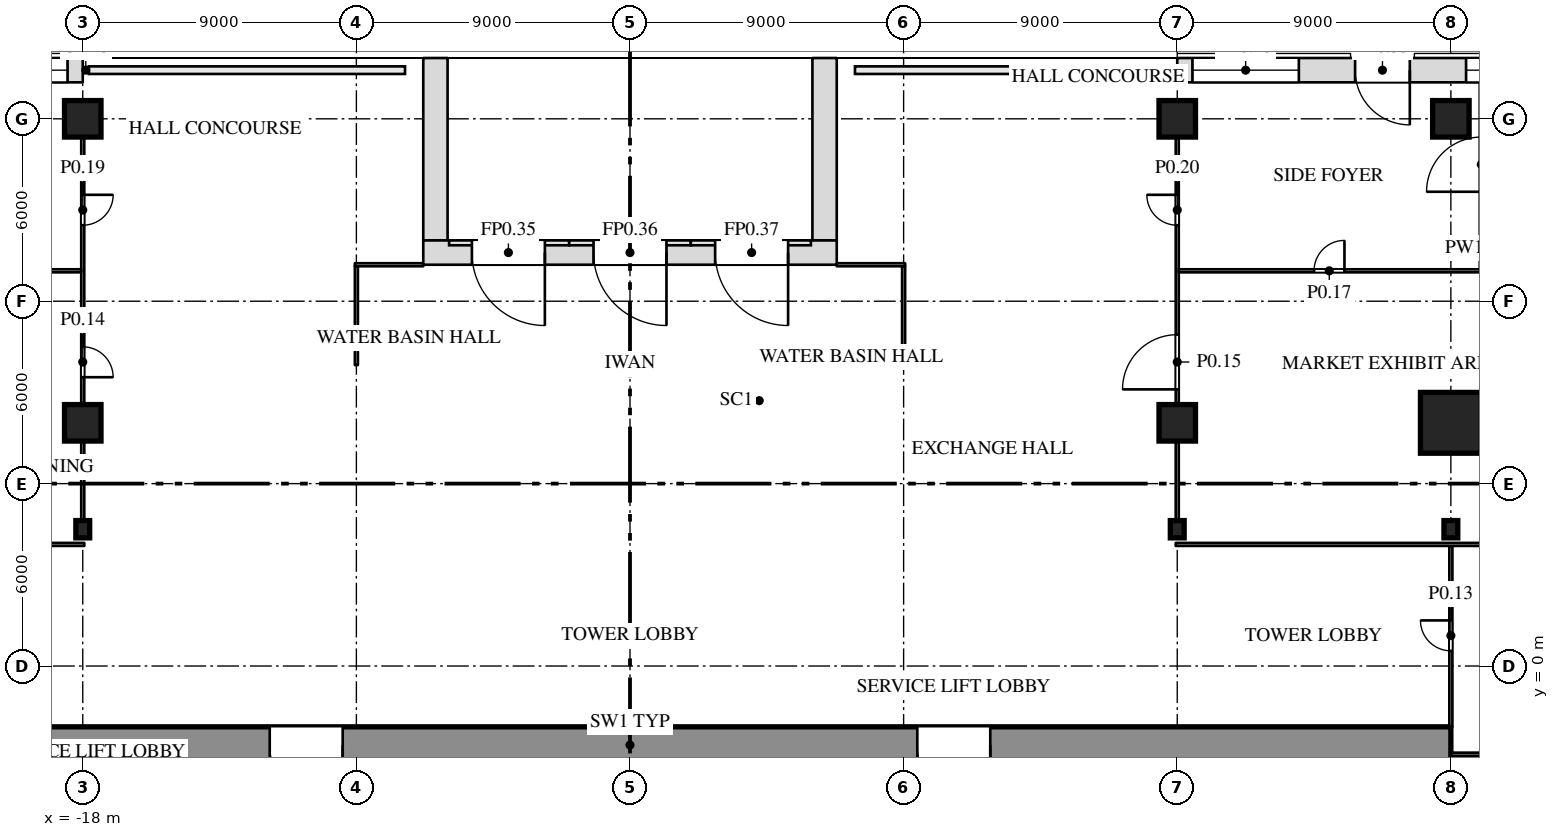
"""IFC4 building model, lengths in metres.
Left out: names, types, materials, properties, quantities, classifications, styles, units other than length and angle.
Written with IfcOpenShell. Run it as: python <this file> out.ifc"""

import sys

from ifc_helpers import new_model, si_unit, direction, frame, frame_2d, origin, origin_2d, place, context, subcontext, project, spatial, rectangle, i_section, extrude, element, fill, save


model = new_model("IFC4")
c1 = context("Model", 3, precision=1e-05, world=origin(), true_north=direction((0.0, 1.0)))
c2 = subcontext(c1, "Body", "Model", "MODEL_VIEW")
j1 = project(units=[si_unit("LENGTHUNIT", "METRE"), si_unit("PLANEANGLEUNIT", "RADIAN")], contexts=[c1])
p1 = place(None, origin())
s1 = spatial("IfcSite", under=j1, at=p1, CompositionType="ELEMENT")
p2 = place(p1, origin())
s2 = spatial("IfcBuilding", under=s1, at=p2, CompositionType="ELEMENT")
p3 = place(p2, origin())
s3 = spatial("IfcBuildingStorey", under=s2, at=p3, CompositionType="ELEMENT", Elevation=0.0)
for number, where, z_axis, x_axis in (
    (1, (-18.0, 4.5, 0.0), (0.0, 0.0, 1.0), (1.0, 0.0, 0.0)),
    (2, (18.0, 4.5, 0.0), (0.0, 0.0, 1.0), (1.0, 0.0, 0.0)),
    (3, (27.0, 4.5, 0.0), (0.0, 0.0, 1.0), (1.0, 0.0, 0.0)),
):
    element("IfcColumn", number, at=place(p3, frame(where, z_axis=z_axis, x_axis=x_axis)), inside=s3, PredefinedType="COLUMN", context=c2, shape_type="SweptSolid", body=[
        extrude(i_section(OverallWidth=0.455, OverallDepth=0.569, WebThickness=0.078, FlangeThickness=0.125, at=origin_2d()), origin(), (0.0, 0.0, 1.0), 9.0),
    ])
for number, where, z_axis, x_axis in (
    (4, (-18.0, 8.0, 0.0), (0.0, 0.0, 1.0), (1.0, 0.0, 0.0)),
    (5, (18.0, 8.0, 0.0), (0.0, 0.0, 1.0), (1.0, 0.0, 0.0)),
):
    element("IfcColumn", number, at=place(p3, frame(where, z_axis=z_axis, x_axis=x_axis)), inside=s3, PredefinedType="COLUMN", context=c2, shape_type="SweptSolid", body=[
        extrude(rectangle(XDim=1.2, YDim=1.2, at=origin_2d()), origin(), (0.0, 0.0, 1.0), 9.0),
    ])
p4 = place(p3, frame((27.0, 8.0, 0.0), z_axis=(0.0, 0.0, 1.0), x_axis=(1.0, 0.0, 0.0)))
e6 = element("IfcColumn", 6, at=p4, inside=s3, PredefinedType="COLUMN", context=c2, shape_type="SweptSolid", body=[
    extrude(rectangle(XDim=2.0, YDim=2.0, at=origin_2d()), origin(), (0.0, 0.0, 1.0), 9.0),
])
for number, where, z_axis, x_axis in (
    (7, (-18.0, 18.0, 0.0), (0.0, 0.0, 1.0), (1.0, 0.0, 0.0)),
    (8, (18.0, 18.0, 0.0), (0.0, 0.0, 1.0), (1.0, 0.0, 0.0)),
    (9, (27.0, 18.0, 0.0), (0.0, 0.0, 1.0), (1.0, 0.0, 0.0)),
):
    element("IfcColumn", number, at=place(p3, frame(where, z_axis=z_axis, x_axis=x_axis)), inside=s3, PredefinedType="COLUMN", context=c2, shape_type="SweptSolid", body=[
        extrude(rectangle(XDim=1.2, YDim=1.2, at=origin_2d()), origin(), (0.0, 0.0, 1.0), 9.0),
    ])
p5 = place(p3, frame((-27.0, -2.6, 0.0), z_axis=(0.0, 0.0, 1.0), x_axis=(1.0, 0.0, 0.0)))
e10 = element("IfcWall", 10, at=p5, inside=s3, PredefinedType="SHEAR", context=c2, shape_type="SweptSolid", body=[
    extrude(rectangle(XDim=54.0, YDim=1.2, at=frame_2d((27.0, 0.0))), origin(), (0.0, 0.0, 1.0), 8.7),
])
p6 = place(p5, frame((15.15, 0.0, 0.0)))
e11 = element("IfcOpeningElement", 11, at=p6, cuts=e10, PredefinedType="OPENING", context=c2, shape_type="SweptSolid", body=[
    extrude(rectangle(XDim=2.4, YDim=2.1, at=frame_2d((1.2, 1.05))), frame((0.0, 0.612, 0.0), z_axis=(0.0, -1.0, 0.0), x_axis=(1.0, 0.0, 0.0)), (0.0, 0.0, 1.0), 1.224),
])
p7 = place(p5, frame((36.45, 0.0, 0.0)))
e12 = element("IfcOpeningElement", 12, at=p7, cuts=e10, PredefinedType="OPENING", context=c2, shape_type="SweptSolid", body=[
    extrude(rectangle(XDim=2.4, YDim=2.1, at=frame_2d((1.2, 1.05))), frame((0.0, 0.612, 0.0), z_axis=(0.0, -1.0, 0.0), x_axis=(1.0, 0.0, 0.0)), (0.0, 0.0, 1.0), 1.224),
])
p8 = place(p3, frame((27.0, -2.9, 0.0), z_axis=(0.0, 0.0, 1.0), x_axis=(1.0, 0.0, 0.0)))
e13 = element("IfcWall", 13, at=p8, inside=s3, PredefinedType="PARTITIONING", context=c2, shape_type="SweptSolid", body=[
    extrude(rectangle(XDim=11.2, YDim=0.1, at=frame_2d((5.6, 0.0))), origin(), (0.0, 0.0, 1.0), 8.7),
])
p9 = place(p3, frame((27.0, -2.0, 0.0), z_axis=(0.0, 0.0, 1.0), x_axis=(0.0, 1.0, 0.0)))
e14 = element("IfcWall", 14, at=p9, inside=s3, PredefinedType="PARTITIONING", context=c2, shape_type="SweptSolid", body=[
    extrude(rectangle(XDim=5.95, YDim=0.1, at=frame_2d((2.975, 0.0))), origin(), (0.0, 0.0, 1.0), 8.088),
])
p10 = place(p9, frame((2.5, 0.0, 0.0)))
e15 = element("IfcOpeningElement", 15, at=p10, cuts=e14, PredefinedType="OPENING", context=c2, shape_type="SweptSolid", body=[
    extrude(rectangle(XDim=1.0, YDim=2.1, at=frame_2d((0.5, 1.05))), frame((0.0, 0.062, 0.0), z_axis=(0.0, -1.0, 0.0), x_axis=(1.0, 0.0, 0.0)), (0.0, 0.0, 1.0), 0.124),
])
p11 = place(p3, frame((-31.9, 4.0, 0.0), z_axis=(0.0, 0.0, 1.0), x_axis=(1.0, 0.0, 0.0)))
e16 = element("IfcWall", 16, at=p11, inside=s3, PredefinedType="PARTITIONING", context=c2, shape_type="SweptSolid", body=[
    extrude(rectangle(XDim=13.95, YDim=0.1, at=frame_2d((6.975, 0.0))), origin(), (0.0, 0.0, 1.0), 8.7),
])
p12 = place(p3, frame((-18.0, 4.784, 0.0), z_axis=(0.0, 0.0, 1.0), x_axis=(0.0, 1.0, 0.0)))
e17 = element("IfcWall", 17, at=p12, inside=s3, PredefinedType="PARTITIONING", context=c2, shape_type="SweptSolid", body=[
    extrude(rectangle(XDim=2.615, YDim=0.1, at=frame_2d((1.308, 0.0))), origin(), (0.0, 0.0, 1.0), 8.088),
])
p13 = place(p3, frame((-18.0, 8.6, 0.0), z_axis=(0.0, 0.0, 1.0), x_axis=(0.0, 1.0, 0.0)))
e18 = element("IfcWall", 18, at=p13, inside=s3, PredefinedType="PARTITIONING", context=c2, shape_type="SweptSolid", body=[
    extrude(rectangle(XDim=8.8, YDim=0.1, at=frame_2d((4.4, 0.0))), origin(), (0.0, 0.0, 1.0), 8.088),
])
p14 = place(p13, frame((0.9, 0.0, 0.0)))
e19 = element("IfcOpeningElement", 19, at=p14, cuts=e18, PredefinedType="OPENING", context=c2, shape_type="SweptSolid", body=[
    extrude(rectangle(XDim=1.0, YDim=2.1, at=frame_2d((0.5, 1.05))), frame((0.0, 0.062, 0.0), z_axis=(0.0, -1.0, 0.0), x_axis=(1.0, 0.0, 0.0)), (0.0, 0.0, 1.0), 0.124),
])
p15 = place(p13, frame((5.9, 0.0, 0.0)))
e20 = element("IfcOpeningElement", 20, at=p15, cuts=e18, PredefinedType="OPENING", context=c2, shape_type="SweptSolid", body=[
    extrude(rectangle(XDim=1.0, YDim=2.1, at=frame_2d((0.5, 1.05))), frame((0.0, 0.062, 0.0), z_axis=(0.0, -1.0, 0.0), x_axis=(1.0, 0.0, 0.0)), (0.0, 0.0, 1.0), 0.124),
])
p16 = place(p3, frame((17.95, 4.0, 0.0), z_axis=(0.0, 0.0, 1.0), x_axis=(1.0, 0.0, 0.0)))
e21 = element("IfcWall", 21, at=p16, inside=s3, PredefinedType="PARTITIONING", context=c2, shape_type="SweptSolid", body=[
    extrude(rectangle(XDim=13.95, YDim=0.1, at=frame_2d((6.975, 0.0))), origin(), (0.0, 0.0, 1.0), 8.7),
])
p17 = place(p3, frame((18.0, 4.784, 0.0), z_axis=(0.0, 0.0, 1.0), x_axis=(0.0, 1.0, 0.0)))
e22 = element("IfcWall", 22, at=p17, inside=s3, PredefinedType="PARTITIONING", context=c2, shape_type="SweptSolid", body=[
    extrude(rectangle(XDim=2.615, YDim=0.1, at=frame_2d((1.308, 0.0))), origin(), (0.0, 0.0, 1.0), 8.088),
])
p18 = place(p3, frame((18.0, 8.6, 0.0), z_axis=(0.0, 0.0, 1.0), x_axis=(0.0, 1.0, 0.0)))
e23 = element("IfcWall", 23, at=p18, inside=s3, PredefinedType="PARTITIONING", context=c2, shape_type="SweptSolid", body=[
    extrude(rectangle(XDim=8.8, YDim=0.1, at=frame_2d((4.4, 0.0))), origin(), (0.0, 0.0, 1.0), 8.088),
])
p19 = place(p18, frame((0.5, 0.0, 0.0)))
e24 = element("IfcOpeningElement", 24, at=p19, cuts=e23, PredefinedType="OPENING", context=c2, shape_type="SweptSolid", body=[
    extrude(rectangle(XDim=1.8, YDim=2.1, at=frame_2d((0.9, 1.05))), frame((0.0, 0.062, 0.0), z_axis=(0.0, -1.0, 0.0), x_axis=(1.0, 0.0, 0.0)), (0.0, 0.0, 1.0), 0.124),
])
p20 = place(p18, frame((5.9, 0.0, 0.0)))
e25 = element("IfcOpeningElement", 25, at=p20, cuts=e23, PredefinedType="OPENING", context=c2, shape_type="SweptSolid", body=[
    extrude(rectangle(XDim=1.0, YDim=2.1, at=frame_2d((0.5, 1.05))), frame((0.0, 0.062, 0.0), z_axis=(0.0, -1.0, 0.0), x_axis=(1.0, 0.0, 0.0)), (0.0, 0.0, 1.0), 0.124),
])
for number, where, z_axis, x_axis in (
    (26, (-9.0, 9.9, 0.0), (0.0, 0.0, 1.0), (0.0, 1.0, 0.0)),
    (27, (9.0, 9.9, 0.0), (0.0, 0.0, 1.0), (0.0, 1.0, 0.0)),
):
    element("IfcWall", number, at=place(p3, frame(where, z_axis=z_axis, x_axis=x_axis)), inside=s3, PredefinedType="PARTITIONING", context=c2, shape_type="SweptSolid", body=[
        extrude(rectangle(XDim=3.25, YDim=0.1, at=frame_2d((1.625, 0.0))), origin(), (0.0, 0.0, 1.0), 8.7),
    ])
p21 = place(p3, frame((-27.95, 13.0, 0.0), z_axis=(0.0, 0.0, 1.0), x_axis=(1.0, 0.0, 0.0)))
e28 = element("IfcWall", 28, at=p21, inside=s3, PredefinedType="PARTITIONING", context=c2, shape_type="SweptSolid", body=[
    extrude(rectangle(XDim=9.9, YDim=0.1, at=frame_2d((4.95, 0.0))), origin(), (0.0, 0.0, 1.0), 8.7),
])
p22 = place(p21, frame((4.45, 0.0, 0.0)))
e29 = element("IfcOpeningElement", 29, at=p22, cuts=e28, PredefinedType="OPENING", context=c2, shape_type="SweptSolid", body=[
    extrude(rectangle(XDim=1.0, YDim=2.1, at=frame_2d((0.5, 1.05))), frame((0.0, 0.062, 0.0), z_axis=(0.0, -1.0, 0.0), x_axis=(1.0, 0.0, 0.0)), (0.0, 0.0, 1.0), 0.124),
])
p23 = place(p3, frame((18.05, 13.0, 0.0), z_axis=(0.0, 0.0, 1.0), x_axis=(1.0, 0.0, 0.0)))
e30 = element("IfcWall", 30, at=p23, inside=s3, PredefinedType="PARTITIONING", context=c2, shape_type="SweptSolid", body=[
    extrude(rectangle(XDim=20.15, YDim=0.1, at=frame_2d((10.075, 0.0))), origin(), (0.0, 0.0, 1.0), 8.7),
])
p24 = place(p23, frame((4.45, 0.0, 0.0)))
e31 = element("IfcOpeningElement", 31, at=p24, cuts=e30, PredefinedType="OPENING", context=c2, shape_type="SweptSolid", body=[
    extrude(rectangle(XDim=1.0, YDim=2.1, at=frame_2d((0.5, 1.05))), frame((0.0, 0.062, 0.0), z_axis=(0.0, -1.0, 0.0), x_axis=(1.0, 0.0, 0.0)), (0.0, 0.0, 1.0), 0.124),
])
for number, where, z_axis, x_axis in (
    (32, (-9.05, 13.2, 0.0), (0.0, 0.0, 1.0), (1.0, 0.0, 0.0)),
    (33, (6.8, 13.2, 0.0), (0.0, 0.0, 1.0), (1.0, 0.0, 0.0)),
):
    element("IfcWall", number, at=place(p3, frame(where, z_axis=z_axis, x_axis=x_axis)), inside=s3, PredefinedType="PARTITIONING", context=c2, shape_type="SweptSolid", body=[
        extrude(rectangle(XDim=2.25, YDim=0.1, at=frame_2d((1.125, 0.0))), origin(), (0.0, 0.0, 1.0), 8.7),
    ])
p25 = place(p3, frame((32.948, 19.6, 0.0), z_axis=(0.0, 0.0, 1.0), x_axis=(-1.0, 0.0, 0.0)))
e34 = element("IfcWall", 34, at=p25, inside=s3, PredefinedType="SOLIDWALL", context=c2, shape_type="SweptSolid", body=[
    extrude(rectangle(XDim=14.948, YDim=0.8, at=frame_2d((7.474, 0.0))), origin(), (0.0, 0.0, 1.0), 8.7),
])
p26 = place(p25, frame((1.948, 0.0, 1.0)))
e35 = element("IfcOpeningElement", 35, at=p26, cuts=e34, PredefinedType="OPENING", context=c2, shape_type="SweptSolid", body=[
    extrude(rectangle(XDim=3.5, YDim=5.5, at=frame_2d((1.75, 2.75))), frame((0.0, 0.412, 0.0), z_axis=(0.0, -1.0, 0.0), x_axis=(1.0, 0.0, 0.0)), (0.0, 0.0, 1.0), 0.824),
])
p27 = place(p25, frame((10.948, 0.0, 1.0)))
e36 = element("IfcOpeningElement", 36, at=p27, cuts=e34, PredefinedType="OPENING", context=c2, shape_type="SweptSolid", body=[
    extrude(rectangle(XDim=3.5, YDim=5.5, at=frame_2d((1.75, 2.75))), frame((0.0, 0.412, 0.0), z_axis=(0.0, -1.0, 0.0), x_axis=(1.0, 0.0, 0.0)), (0.0, 0.0, 1.0), 0.824),
])
p28 = place(p25, frame((7.298, 0.0, 0.0)))
e37 = element("IfcOpeningElement", 37, at=p28, cuts=e34, PredefinedType="OPENING", context=c2, shape_type="SweptSolid", body=[
    extrude(rectangle(XDim=1.8, YDim=2.4, at=frame_2d((0.9, 1.2))), frame((0.0, 0.412, 0.0), z_axis=(0.0, -1.0, 0.0), x_axis=(1.0, 0.0, 0.0)), (0.0, 0.0, 1.0), 0.824),
])
p29 = place(p3, frame((-18.0, 19.6, 0.0), z_axis=(0.0, 0.0, 1.0), x_axis=(-1.0, 0.0, 0.0)))
e38 = element("IfcWall", 38, at=p29, inside=s3, PredefinedType="SOLIDWALL", context=c2, shape_type="SweptSolid", body=[
    extrude(rectangle(XDim=14.948, YDim=0.8, at=frame_2d((7.474, 0.0))), origin(), (0.0, 0.0, 1.0), 8.7),
])
p30 = place(p29, frame((0.5, 0.0, 1.0)))
e39 = element("IfcOpeningElement", 39, at=p30, cuts=e38, PredefinedType="OPENING", context=c2, shape_type="SweptSolid", body=[
    extrude(rectangle(XDim=3.5, YDim=5.5, at=frame_2d((1.75, 2.75))), frame((0.0, 0.412, 0.0), z_axis=(0.0, -1.0, 0.0), x_axis=(1.0, 0.0, 0.0)), (0.0, 0.0, 1.0), 0.824),
])
p31 = place(p29, frame((9.5, 0.0, 1.0)))
e40 = element("IfcOpeningElement", 40, at=p31, cuts=e38, PredefinedType="OPENING", context=c2, shape_type="SweptSolid", body=[
    extrude(rectangle(XDim=3.5, YDim=5.5, at=frame_2d((1.75, 2.75))), frame((0.0, 0.412, 0.0), z_axis=(0.0, -1.0, 0.0), x_axis=(1.0, 0.0, 0.0)), (0.0, 0.0, 1.0), 0.824),
])
p32 = place(p29, frame((5.85, 0.0, 0.0)))
e41 = element("IfcOpeningElement", 41, at=p32, cuts=e38, PredefinedType="OPENING", context=c2, shape_type="SweptSolid", body=[
    extrude(rectangle(XDim=1.8, YDim=2.4, at=frame_2d((0.9, 1.2))), frame((0.0, 0.412, 0.0), z_axis=(0.0, -1.0, 0.0), x_axis=(1.0, 0.0, 0.0)), (0.0, 0.0, 1.0), 0.824),
])
for number, where, z_axis, x_axis in (
    (42, (-6.4, 14.0, 0.0), (0.0, 0.0, 1.0), (0.0, 1.0, 0.0)),
    (43, (6.4, 14.0, 0.0), (0.0, 0.0, 1.0), (0.0, 1.0, 0.0)),
):
    element("IfcWall", number, at=place(p3, frame(where, z_axis=z_axis, x_axis=x_axis)), inside=s3, PredefinedType="SOLIDWALL", context=c2, shape_type="SweptSolid", body=[
        extrude(rectangle(XDim=6.0, YDim=0.8, at=frame_2d((3.0, 0.0))), origin(), (0.0, 0.0, 1.0), 8.7),
    ])
p33 = place(p3, frame((-6.8, 13.6, 0.0), z_axis=(0.0, 0.0, 1.0), x_axis=(1.0, 0.0, 0.0)))
e44 = element("IfcWall", 44, at=p33, inside=s3, PredefinedType="SOLIDWALL", context=c2, shape_type="SweptSolid", body=[
    extrude(rectangle(XDim=13.6, YDim=0.8, at=frame_2d((6.8, 0.0))), origin(), (0.0, 0.0, 1.0), 3.5),
])
p34 = place(p33, frame((1.6, 0.0, 0.0)))
e45 = element("IfcOpeningElement", 45, at=p34, cuts=e44, PredefinedType="OPENING", context=c2, shape_type="SweptSolid", body=[
    extrude(rectangle(XDim=2.4, YDim=3.0, at=frame_2d((1.2, 1.5))), frame((0.0, 0.412, 0.0), z_axis=(0.0, -1.0, 0.0), x_axis=(1.0, 0.0, 0.0)), (0.0, 0.0, 1.0), 0.824),
])
p35 = place(p33, frame((5.6, 0.0, 0.0)))
e46 = element("IfcOpeningElement", 46, at=p35, cuts=e44, PredefinedType="OPENING", context=c2, shape_type="SweptSolid", body=[
    extrude(rectangle(XDim=2.4, YDim=3.0, at=frame_2d((1.2, 1.5))), frame((0.0, 0.412, 0.0), z_axis=(0.0, -1.0, 0.0), x_axis=(1.0, 0.0, 0.0)), (0.0, 0.0, 1.0), 0.824),
])
p36 = place(p33, frame((9.6, 0.0, 0.0)))
e47 = element("IfcOpeningElement", 47, at=p36, cuts=e44, PredefinedType="OPENING", context=c2, shape_type="SweptSolid", body=[
    extrude(rectangle(XDim=2.4, YDim=3.0, at=frame_2d((1.2, 1.5))), frame((0.0, 0.412, 0.0), z_axis=(0.0, -1.0, 0.0), x_axis=(1.0, 0.0, 0.0)), (0.0, 0.0, 1.0), 0.824),
])
p37 = place(p10, origin())
e48 = element("IfcDoor", 48, at=p37, inside=s3, OperationType="SINGLE_SWING_RIGHT", PredefinedType="DOOR", context=c2, shape_type="SweptSolid", body=[
    extrude(rectangle(XDim=1.0, YDim=2.1, at=frame_2d((0.5, 1.05))), frame((0.0, 0.025, 0.0), z_axis=(0.0, -1.0, 0.0), x_axis=(1.0, 0.0, 0.0)), (0.0, 0.0, 1.0), 0.05),
])
fill(e15, e48)
p38 = place(p14, origin())
e49 = element("IfcDoor", 49, at=p38, inside=s3, OperationType="SINGLE_SWING_RIGHT", PredefinedType="DOOR", context=c2, shape_type="SweptSolid", body=[
    extrude(rectangle(XDim=1.0, YDim=2.1, at=frame_2d((0.5, 1.05))), frame((0.0, 0.025, 0.0), z_axis=(0.0, -1.0, 0.0), x_axis=(1.0, 0.0, 0.0)), (0.0, 0.0, 1.0), 0.05),
])
fill(e19, e49)
p39 = place(p19, origin())
e50 = element("IfcDoor", 50, at=p39, inside=s3, OperationType="DOUBLE_DOOR_SINGLE_SWING", PredefinedType="DOOR", context=c2, shape_type="SweptSolid", body=[
    extrude(rectangle(XDim=1.8, YDim=2.1, at=frame_2d((0.9, 1.05))), frame((0.0, 0.025, 0.0), z_axis=(0.0, -1.0, 0.0), x_axis=(1.0, 0.0, 0.0)), (0.0, 0.0, 1.0), 0.05),
])
fill(e24, e50)
p40 = place(p24, origin())
e51 = element("IfcDoor", 51, at=p40, inside=s3, OperationType="SINGLE_SWING_RIGHT", PredefinedType="DOOR", context=c2, shape_type="SweptSolid", body=[
    extrude(rectangle(XDim=1.0, YDim=2.1, at=frame_2d((0.5, 1.05))), frame((0.0, 0.025, 0.0), z_axis=(0.0, -1.0, 0.0), x_axis=(1.0, 0.0, 0.0)), (0.0, 0.0, 1.0), 0.05),
])
fill(e31, e51)
p41 = place(p15, origin())
e52 = element("IfcDoor", 52, at=p41, inside=s3, OperationType="SINGLE_SWING_LEFT", PredefinedType="DOOR", context=c2, shape_type="SweptSolid", body=[
    extrude(rectangle(XDim=1.0, YDim=2.1, at=frame_2d((0.5, 1.05))), frame((0.0, 0.025, 0.0), z_axis=(0.0, -1.0, 0.0), x_axis=(1.0, 0.0, 0.0)), (0.0, 0.0, 1.0), 0.05),
])
fill(e20, e52)
p42 = place(p20, origin())
e53 = element("IfcDoor", 53, at=p42, inside=s3, OperationType="SINGLE_SWING_RIGHT", PredefinedType="DOOR", context=c2, shape_type="SweptSolid", body=[
    extrude(rectangle(XDim=1.0, YDim=2.1, at=frame_2d((0.5, 1.05))), frame((0.0, 0.025, 0.0), z_axis=(0.0, -1.0, 0.0), x_axis=(1.0, 0.0, 0.0)), (0.0, 0.0, 1.0), 0.05),
])
fill(e25, e53)
p43 = place(p30, origin())
e54 = element("IfcWindow", 54, at=p43, inside=s3, PartitioningType="SINGLE_PANEL", PredefinedType="WINDOW", context=c2, shape_type="SweptSolid", body=[
    extrude(rectangle(XDim=3.5, YDim=5.5, at=frame_2d((1.75, 2.75))), frame((0.0, 0.03, 0.0), z_axis=(0.0, -1.0, 0.0), x_axis=(1.0, 0.0, 0.0)), (0.0, 0.0, 1.0), 0.06),
])
fill(e39, e54)
p44 = place(p26, origin())
e55 = element("IfcWindow", 55, at=p44, inside=s3, PartitioningType="SINGLE_PANEL", PredefinedType="WINDOW", context=c2, shape_type="SweptSolid", body=[
    extrude(rectangle(XDim=3.5, YDim=5.5, at=frame_2d((1.75, 2.75))), frame((0.0, 0.03, 0.0), z_axis=(0.0, -1.0, 0.0), x_axis=(1.0, 0.0, 0.0)), (0.0, 0.0, 1.0), 0.06),
])
fill(e35, e55)
p45 = place(p27, origin())
e56 = element("IfcWindow", 56, at=p45, inside=s3, PartitioningType="SINGLE_PANEL", PredefinedType="WINDOW", context=c2, shape_type="SweptSolid", body=[
    extrude(rectangle(XDim=3.5, YDim=5.5, at=frame_2d((1.75, 2.75))), frame((0.0, 0.03, 0.0), z_axis=(0.0, -1.0, 0.0), x_axis=(1.0, 0.0, 0.0)), (0.0, 0.0, 1.0), 0.06),
])
fill(e36, e56)
p46 = place(p28, frame((1.8, 0.0, 0.0), z_axis=(0.0, 0.0, 1.0), x_axis=(-1.0, 0.0, 0.0)))
e57 = element("IfcDoor", 57, at=p46, inside=s3, OperationType="DOUBLE_DOOR_SINGLE_SWING", PredefinedType="DOOR", context=c2, shape_type="SweptSolid", body=[
    extrude(rectangle(XDim=1.8, YDim=2.4, at=frame_2d((0.9, 1.2))), frame((0.0, 0.025, 0.0), z_axis=(0.0, -1.0, 0.0), x_axis=(1.0, 0.0, 0.0)), (0.0, 0.0, 1.0), 0.05),
])
fill(e37, e57)
p47 = place(p34, frame((2.4, 0.0, 0.0), z_axis=(0.0, 0.0, 1.0), x_axis=(-1.0, 0.0, 0.0)))
e58 = element("IfcDoor", 58, at=p47, inside=s3, OperationType="DOUBLE_DOOR_SINGLE_SWING", PredefinedType="DOOR", context=c2, shape_type="SweptSolid", body=[
    extrude(rectangle(XDim=2.4, YDim=3.0, at=frame_2d((1.2, 1.5))), frame((0.0, 0.025, 0.0), z_axis=(0.0, -1.0, 0.0), x_axis=(1.0, 0.0, 0.0)), (0.0, 0.0, 1.0), 0.05),
])
fill(e45, e58)
p48 = place(p35, frame((2.4, 0.0, 0.0), z_axis=(0.0, 0.0, 1.0), x_axis=(-1.0, 0.0, 0.0)))
e59 = element("IfcDoor", 59, at=p48, inside=s3, OperationType="DOUBLE_DOOR_SINGLE_SWING", PredefinedType="DOOR", context=c2, shape_type="SweptSolid", body=[
    extrude(rectangle(XDim=2.4, YDim=3.0, at=frame_2d((1.2, 1.5))), frame((0.0, 0.025, 0.0), z_axis=(0.0, -1.0, 0.0), x_axis=(1.0, 0.0, 0.0)), (0.0, 0.0, 1.0), 0.05),
])
fill(e46, e59)
p49 = place(p36, frame((2.4, 0.0, 0.0), z_axis=(0.0, 0.0, 1.0), x_axis=(-1.0, 0.0, 0.0)))
e60 = element("IfcDoor", 60, at=p49, inside=s3, OperationType="DOUBLE_DOOR_SINGLE_SWING", PredefinedType="DOOR", context=c2, shape_type="SweptSolid", body=[
    extrude(rectangle(XDim=2.4, YDim=3.0, at=frame_2d((1.2, 1.5))), frame((0.0, 0.025, 0.0), z_axis=(0.0, -1.0, 0.0), x_axis=(1.0, 0.0, 0.0)), (0.0, 0.0, 1.0), 0.05),
])
fill(e47, e60)
p50 = place(p6, origin())
e61 = element("IfcDoor", 61, at=p50, inside=s3, OperationType="DOUBLE_DOOR_SINGLE_SWING", PredefinedType="DOOR", context=c2, shape_type="SweptSolid", body=[
    extrude(rectangle(XDim=2.4, YDim=2.1, at=frame_2d((1.2, 1.05))), frame((0.0, 0.025, 0.0), z_axis=(0.0, -1.0, 0.0), x_axis=(1.0, 0.0, 0.0)), (0.0, 0.0, 1.0), 0.05),
])
fill(e11, e61)
p51 = place(p7, origin())
e62 = element("IfcDoor", 62, at=p51, inside=s3, OperationType="DOUBLE_DOOR_SINGLE_SWING", PredefinedType="DOOR", context=c2, shape_type="SweptSolid", body=[
    extrude(rectangle(XDim=2.4, YDim=2.1, at=frame_2d((1.2, 1.05))), frame((0.0, 0.025, 0.0), z_axis=(0.0, -1.0, 0.0), x_axis=(1.0, 0.0, 0.0)), (0.0, 0.0, 1.0), 0.05),
])
fill(e12, e62)
save(model, sys.argv[1])
